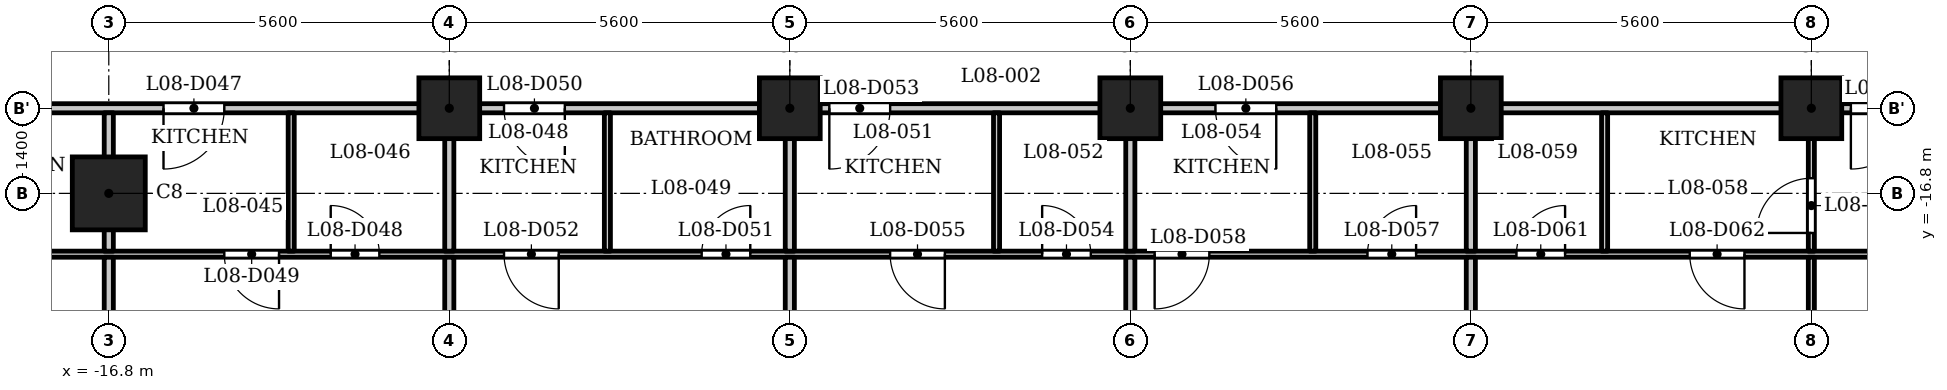
"""IFC4 building model, lengths in metres.
Left out: names, types, materials, properties, quantities, classifications, styles, units other than length and angle.
Written with IfcOpenShell. Run it as: python <this file> out.ifc"""

import sys

from ifc_helpers import new_model, si_unit, direction, frame, frame_2d, origin, origin_2d, place, context, subcontext, project, spatial, rectangle, extrude, element, fill, save


model = new_model("IFC4")
c1 = context("Model", 3, precision=1e-05, world=origin(), true_north=direction((0.0, 1.0)))
c2 = subcontext(c1, "Body", "Model", "MODEL_VIEW")
j1 = project(units=[si_unit("LENGTHUNIT", "METRE"), si_unit("PLANEANGLEUNIT", "RADIAN")], contexts=[c1])
p1 = place(None, origin())
s1 = spatial("IfcSite", under=j1, at=p1, CompositionType="ELEMENT")
p2 = place(p1, origin())
s2 = spatial("IfcBuilding", under=s1, at=p2, CompositionType="ELEMENT")
p3 = place(p2, frame((0.0, 0.0, 37.5)))
s3 = spatial("IfcBuildingStorey", under=s2, at=p3, CompositionType="ELEMENT", Elevation=37.5)
p4 = place(p3, frame((-16.8, -16.8, 0.0), z_axis=(0.0, 0.0, 1.0), x_axis=(1.0, 0.0, 0.0)))
e1 = element("IfcColumn", 1, at=p4, inside=s3, PredefinedType="COLUMN", context=c2, shape_type="SweptSolid", body=[
    extrude(rectangle(XDim=1.2, YDim=1.2, at=origin_2d()), origin(), (0.0, 0.0, 1.0), 3.5),
])
for number, where, z_axis, x_axis in (
    (2, (-11.2, -15.4, 0.0), (0.0, 0.0, 1.0), (1.0, 0.0, 0.0)),
    (3, (-5.6, -15.4, 0.0), (0.0, 0.0, 1.0), (1.0, 0.0, 0.0)),
    (4, (0.0, -15.4, 0.0), (0.0, 0.0, 1.0), (1.0, 0.0, 0.0)),
    (5, (5.6, -15.4, 0.0), (0.0, 0.0, 1.0), (1.0, 0.0, 0.0)),
    (6, (11.2, -15.4, 0.0), (0.0, 0.0, 1.0), (1.0, 0.0, 0.0)),
):
    element("IfcColumn", number, at=place(p3, frame(where, z_axis=z_axis, x_axis=x_axis)), inside=s3, PredefinedType="COLUMN", context=c2, shape_type="SweptSolid", body=[
        extrude(rectangle(XDim=1.0, YDim=1.0, at=origin_2d()), origin(), (0.0, 0.0, 1.0), 3.5),
    ])
p5 = place(p3, frame((-26.394, -17.8, 0.0), z_axis=(0.0, 0.0, 1.0), x_axis=(1.0, 0.0, 0.0)))
e7 = element("IfcWall", 7, at=p5, inside=s3, PredefinedType="PARTITIONING", context=c2, shape_type="SweptSolid", body=[
    extrude(rectangle(XDim=53.126, YDim=0.1, at=frame_2d((26.563, 0.0))), origin(), (0.0, 0.0, 1.0), 3.2),
])
p6 = place(p5, frame((0.794, 0.0, 0.0)))
e8 = element("IfcOpeningElement", 8, at=p6, cuts=e7, PredefinedType="OPENING", context=c2, shape_type="SweptSolid", body=[
    extrude(rectangle(XDim=0.8, YDim=2.1, at=frame_2d((0.4, 1.05))), frame((0.0, 0.06, 0.0), z_axis=(0.0, -1.0, 0.0), x_axis=(1.0, 0.0, 0.0)), (0.0, 0.0, 1.0), 0.12),
])
p7 = place(p5, frame((5.644, 0.0, 0.0)))
e9 = element("IfcOpeningElement", 9, at=p7, cuts=e7, PredefinedType="OPENING", context=c2, shape_type="SweptSolid", body=[
    extrude(rectangle(XDim=0.9, YDim=2.1, at=frame_2d((0.45, 1.05))), frame((0.0, 0.06, 0.0), z_axis=(0.0, -1.0, 0.0), x_axis=(1.0, 0.0, 0.0)), (0.0, 0.0, 1.0), 0.12),
])
p8 = place(p5, frame((13.244, 0.0, 0.0)))
e10 = element("IfcOpeningElement", 10, at=p8, cuts=e7, PredefinedType="OPENING", context=c2, shape_type="SweptSolid", body=[
    extrude(rectangle(XDim=0.8, YDim=2.1, at=frame_2d((0.4, 1.05))), frame((0.0, 0.06, 0.0), z_axis=(0.0, -1.0, 0.0), x_axis=(1.0, 0.0, 0.0)), (0.0, 0.0, 1.0), 0.12),
])
p9 = place(p5, frame((11.494, 0.0, 0.0)))
e11 = element("IfcOpeningElement", 11, at=p9, cuts=e7, PredefinedType="OPENING", context=c2, shape_type="SweptSolid", body=[
    extrude(rectangle(XDim=0.9, YDim=2.1, at=frame_2d((0.45, 1.05))), frame((0.0, 0.06, 0.0), z_axis=(0.0, -1.0, 0.0), x_axis=(1.0, 0.0, 0.0)), (0.0, 0.0, 1.0), 0.12),
])
p10 = place(p5, frame((19.344, 0.0, 0.0)))
e12 = element("IfcOpeningElement", 12, at=p10, cuts=e7, PredefinedType="OPENING", context=c2, shape_type="SweptSolid", body=[
    extrude(rectangle(XDim=0.8, YDim=2.1, at=frame_2d((0.4, 1.05))), frame((0.0, 0.06, 0.0), z_axis=(0.0, -1.0, 0.0), x_axis=(1.0, 0.0, 0.0)), (0.0, 0.0, 1.0), 0.12),
])
p11 = place(p5, frame((16.094, 0.0, 0.0)))
e13 = element("IfcOpeningElement", 13, at=p11, cuts=e7, PredefinedType="OPENING", context=c2, shape_type="SweptSolid", body=[
    extrude(rectangle(XDim=0.9, YDim=2.1, at=frame_2d((0.45, 1.05))), frame((0.0, 0.06, 0.0), z_axis=(0.0, -1.0, 0.0), x_axis=(1.0, 0.0, 0.0)), (0.0, 0.0, 1.0), 0.12),
])
p12 = place(p5, frame((24.944, 0.0, 0.0)))
e14 = element("IfcOpeningElement", 14, at=p12, cuts=e7, PredefinedType="OPENING", context=c2, shape_type="SweptSolid", body=[
    extrude(rectangle(XDim=0.8, YDim=2.1, at=frame_2d((0.4, 1.05))), frame((0.0, 0.06, 0.0), z_axis=(0.0, -1.0, 0.0), x_axis=(1.0, 0.0, 0.0)), (0.0, 0.0, 1.0), 0.12),
])
p13 = place(p5, frame((22.444, 0.0, 0.0)))
e15 = element("IfcOpeningElement", 15, at=p13, cuts=e7, PredefinedType="OPENING", context=c2, shape_type="SweptSolid", body=[
    extrude(rectangle(XDim=0.9, YDim=2.1, at=frame_2d((0.45, 1.05))), frame((0.0, 0.06, 0.0), z_axis=(0.0, -1.0, 0.0), x_axis=(1.0, 0.0, 0.0)), (0.0, 0.0, 1.0), 0.12),
])
p14 = place(p5, frame((30.294, 0.0, 0.0)))
e16 = element("IfcOpeningElement", 16, at=p14, cuts=e7, PredefinedType="OPENING", context=c2, shape_type="SweptSolid", body=[
    extrude(rectangle(XDim=0.8, YDim=2.1, at=frame_2d((0.4, 1.05))), frame((0.0, 0.06, 0.0), z_axis=(0.0, -1.0, 0.0), x_axis=(1.0, 0.0, 0.0)), (0.0, 0.0, 1.0), 0.12),
])
p15 = place(p5, frame((26.794, 0.0, 0.0)))
e17 = element("IfcOpeningElement", 17, at=p15, cuts=e7, PredefinedType="OPENING", context=c2, shape_type="SweptSolid", body=[
    extrude(rectangle(XDim=0.9, YDim=2.1, at=frame_2d((0.45, 1.05))), frame((0.0, 0.06, 0.0), z_axis=(0.0, -1.0, 0.0), x_axis=(1.0, 0.0, 0.0)), (0.0, 0.0, 1.0), 0.12),
])
p16 = place(p5, frame((32.744, 0.0, 0.0)))
e18 = element("IfcOpeningElement", 18, at=p16, cuts=e7, PredefinedType="OPENING", context=c2, shape_type="SweptSolid", body=[
    extrude(rectangle(XDim=0.8, YDim=2.1, at=frame_2d((0.4, 1.05))), frame((0.0, 0.06, 0.0), z_axis=(0.0, -1.0, 0.0), x_axis=(1.0, 0.0, 0.0)), (0.0, 0.0, 1.0), 0.12),
])
p17 = place(p5, frame((35.594, 0.0, 0.0)))
e19 = element("IfcOpeningElement", 19, at=p17, cuts=e7, PredefinedType="OPENING", context=c2, shape_type="SweptSolid", body=[
    extrude(rectangle(XDim=0.9, YDim=2.1, at=frame_2d((0.45, 1.05))), frame((0.0, 0.06, 0.0), z_axis=(0.0, -1.0, 0.0), x_axis=(1.0, 0.0, 0.0)), (0.0, 0.0, 1.0), 0.12),
])
p18 = place(p5, frame((39.244, 0.0, 0.0)))
e20 = element("IfcOpeningElement", 20, at=p18, cuts=e7, PredefinedType="OPENING", context=c2, shape_type="SweptSolid", body=[
    extrude(rectangle(XDim=0.9, YDim=2.1, at=frame_2d((0.45, 1.05))), frame((0.0, 0.06, 0.0), z_axis=(0.0, -1.0, 0.0), x_axis=(1.0, 0.0, 0.0)), (0.0, 0.0, 1.0), 0.12),
])
p19 = place(p5, frame((41.544, 0.0, 0.0)))
e21 = element("IfcOpeningElement", 21, at=p19, cuts=e7, PredefinedType="OPENING", context=c2, shape_type="SweptSolid", body=[
    extrude(rectangle(XDim=0.9, YDim=2.1, at=frame_2d((0.45, 1.05))), frame((0.0, 0.06, 0.0), z_axis=(0.0, -1.0, 0.0), x_axis=(1.0, 0.0, 0.0)), (0.0, 0.0, 1.0), 0.12),
])
p20 = place(p5, frame((49.362, 0.0, 0.0)))
e22 = element("IfcOpeningElement", 22, at=p20, cuts=e7, PredefinedType="OPENING", context=c2, shape_type="SweptSolid", body=[
    extrude(rectangle(XDim=0.8, YDim=2.1, at=frame_2d((0.4, 1.05))), frame((0.0, 0.06, 0.0), z_axis=(0.0, -1.0, 0.0), x_axis=(1.0, 0.0, 0.0)), (0.0, 0.0, 1.0), 0.12),
])
p21 = place(p5, frame((45.094, 0.0, 0.0)))
e23 = element("IfcOpeningElement", 23, at=p21, cuts=e7, PredefinedType="OPENING", context=c2, shape_type="SweptSolid", body=[
    extrude(rectangle(XDim=0.9, YDim=2.1, at=frame_2d((0.45, 1.05))), frame((0.0, 0.06, 0.0), z_axis=(0.0, -1.0, 0.0), x_axis=(1.0, 0.0, 0.0)), (0.0, 0.0, 1.0), 0.12),
])
p22 = place(p3, frame((-27.484, -15.4, 0.0), z_axis=(0.0, 0.0, 1.0), x_axis=(1.0, 0.0, 0.0)))
e24 = element("IfcWall", 24, at=p22, inside=s3, PredefinedType="PARTITIONING", context=c2, shape_type="SweptSolid", body=[
    extrude(rectangle(XDim=54.968, YDim=0.15, at=frame_2d((27.484, 0.0))), origin(), (0.0, 0.0, 1.0), 3.2),
])
p23 = place(p22, frame((5.734, 0.0, 0.0)))
e25 = element("IfcOpeningElement", 25, at=p23, cuts=e24, PredefinedType="OPENING", context=c2, shape_type="SweptSolid", body=[
    extrude(rectangle(XDim=1.0, YDim=2.1, at=frame_2d((0.5, 1.05))), frame((0.0, 0.085, 0.0), z_axis=(0.0, -1.0, 0.0), x_axis=(1.0, 0.0, 0.0)), (0.0, 0.0, 1.0), 0.17),
])
p24 = place(p22, frame((11.584, 0.0, 0.0)))
e26 = element("IfcOpeningElement", 26, at=p24, cuts=e24, PredefinedType="OPENING", context=c2, shape_type="SweptSolid", body=[
    extrude(rectangle(XDim=1.0, YDim=2.1, at=frame_2d((0.5, 1.05))), frame((0.0, 0.085, 0.0), z_axis=(0.0, -1.0, 0.0), x_axis=(1.0, 0.0, 0.0)), (0.0, 0.0, 1.0), 0.17),
])
p25 = place(p22, frame((17.184, 0.0, 0.0)))
e27 = element("IfcOpeningElement", 27, at=p25, cuts=e24, PredefinedType="OPENING", context=c2, shape_type="SweptSolid", body=[
    extrude(rectangle(XDim=1.0, YDim=2.1, at=frame_2d((0.5, 1.05))), frame((0.0, 0.085, 0.0), z_axis=(0.0, -1.0, 0.0), x_axis=(1.0, 0.0, 0.0)), (0.0, 0.0, 1.0), 0.17),
])
p26 = place(p22, frame((22.534, 0.0, 0.0)))
e28 = element("IfcOpeningElement", 28, at=p26, cuts=e24, PredefinedType="OPENING", context=c2, shape_type="SweptSolid", body=[
    extrude(rectangle(XDim=1.0, YDim=2.1, at=frame_2d((0.5, 1.05))), frame((0.0, 0.085, 0.0), z_axis=(0.0, -1.0, 0.0), x_axis=(1.0, 0.0, 0.0)), (0.0, 0.0, 1.0), 0.17),
])
p27 = place(p22, frame((28.884, 0.0, 0.0)))
e29 = element("IfcOpeningElement", 29, at=p27, cuts=e24, PredefinedType="OPENING", context=c2, shape_type="SweptSolid", body=[
    extrude(rectangle(XDim=1.0, YDim=2.1, at=frame_2d((0.5, 1.05))), frame((0.0, 0.085, 0.0), z_axis=(0.0, -1.0, 0.0), x_axis=(1.0, 0.0, 0.0)), (0.0, 0.0, 1.0), 0.17),
])
p28 = place(p22, frame((39.334, 0.0, 0.0)))
e30 = element("IfcOpeningElement", 30, at=p28, cuts=e24, PredefinedType="OPENING", context=c2, shape_type="SweptSolid", body=[
    extrude(rectangle(XDim=1.0, YDim=2.1, at=frame_2d((0.5, 1.05))), frame((0.0, 0.085, 0.0), z_axis=(0.0, -1.0, 0.0), x_axis=(1.0, 0.0, 0.0)), (0.0, 0.0, 1.0), 0.17),
])
p29 = place(p22, frame((45.184, 0.0, 0.0)))
e31 = element("IfcOpeningElement", 31, at=p29, cuts=e24, PredefinedType="OPENING", context=c2, shape_type="SweptSolid", body=[
    extrude(rectangle(XDim=1.0, YDim=2.1, at=frame_2d((0.5, 1.05))), frame((0.0, 0.085, 0.0), z_axis=(0.0, -1.0, 0.0), x_axis=(1.0, 0.0, 0.0)), (0.0, 0.0, 1.0), 0.17),
])
p30 = place(p3, frame((-16.8, -23.13, 0.0), z_axis=(0.0, 0.0, 1.0), x_axis=(0.0, 1.0, 0.0)))
e32 = element("IfcWall", 32, at=p30, inside=s3, PredefinedType="PARTITIONING", context=c2, shape_type="SweptSolid", body=[
    extrude(rectangle(XDim=5.28, YDim=0.15, at=frame_2d((2.64, 0.0))), origin(), (0.0, 0.0, 1.0), 3.2),
])
p31 = place(p3, frame((-16.8, -17.75, 0.0), z_axis=(0.0, 0.0, 1.0), x_axis=(0.0, 1.0, 0.0)))
e33 = element("IfcWall", 33, at=p31, inside=s3, PredefinedType="PARTITIONING", context=c2, shape_type="SweptSolid", body=[
    extrude(rectangle(XDim=2.275, YDim=0.15, at=frame_2d((1.137, 0.0))), origin(), (0.0, 0.0, 1.0), 3.2),
])
p32 = place(p3, frame((-13.8, -17.75, 0.0), z_axis=(0.0, 0.0, 1.0), x_axis=(0.0, 1.0, 0.0)))
e34 = element("IfcWall", 34, at=p32, inside=s3, PredefinedType="PARTITIONING", context=c2, shape_type="SweptSolid", body=[
    extrude(rectangle(XDim=2.275, YDim=0.1, at=frame_2d((1.137, 0.0))), origin(), (0.0, 0.0, 1.0), 3.2),
])
p33 = place(p3, frame((-11.2, -23.13, 0.0), z_axis=(0.0, 0.0, 1.0), x_axis=(0.0, 1.0, 0.0)))
e35 = element("IfcWall", 35, at=p33, inside=s3, PredefinedType="PARTITIONING", context=c2, shape_type="SweptSolid", body=[
    extrude(rectangle(XDim=5.28, YDim=0.15, at=frame_2d((2.64, 0.0))), origin(), (0.0, 0.0, 1.0), 3.2),
])
p34 = place(p3, frame((-11.2, -17.75, 0.0), z_axis=(0.0, 0.0, 1.0), x_axis=(0.0, 1.0, 0.0)))
e36 = element("IfcWall", 36, at=p34, inside=s3, PredefinedType="PARTITIONING", context=c2, shape_type="SweptSolid", body=[
    extrude(rectangle(XDim=2.275, YDim=0.15, at=frame_2d((1.137, 0.0))), origin(), (0.0, 0.0, 1.0), 3.2),
])
p35 = place(p3, frame((-8.6, -17.75, 0.0), z_axis=(0.0, 0.0, 1.0), x_axis=(0.0, 1.0, 0.0)))
e37 = element("IfcWall", 37, at=p35, inside=s3, PredefinedType="PARTITIONING", context=c2, shape_type="SweptSolid", body=[
    extrude(rectangle(XDim=2.275, YDim=0.1, at=frame_2d((1.137, 0.0))), origin(), (0.0, 0.0, 1.0), 3.2),
])
p36 = place(p3, frame((-5.6, -23.13, 0.0), z_axis=(0.0, 0.0, 1.0), x_axis=(0.0, 1.0, 0.0)))
e38 = element("IfcWall", 38, at=p36, inside=s3, PredefinedType="PARTITIONING", context=c2, shape_type="SweptSolid", body=[
    extrude(rectangle(XDim=5.28, YDim=0.15, at=frame_2d((2.64, 0.0))), origin(), (0.0, 0.0, 1.0), 3.2),
])
p37 = place(p3, frame((-5.6, -17.75, 0.0), z_axis=(0.0, 0.0, 1.0), x_axis=(0.0, 1.0, 0.0)))
e39 = element("IfcWall", 39, at=p37, inside=s3, PredefinedType="PARTITIONING", context=c2, shape_type="SweptSolid", body=[
    extrude(rectangle(XDim=2.275, YDim=0.15, at=frame_2d((1.137, 0.0))), origin(), (0.0, 0.0, 1.0), 3.2),
])
p38 = place(p3, frame((-2.2, -17.75, 0.0), z_axis=(0.0, 0.0, 1.0), x_axis=(0.0, 1.0, 0.0)))
e40 = element("IfcWall", 40, at=p38, inside=s3, PredefinedType="PARTITIONING", context=c2, shape_type="SweptSolid", body=[
    extrude(rectangle(XDim=2.275, YDim=0.1, at=frame_2d((1.137, 0.0))), origin(), (0.0, 0.0, 1.0), 3.2),
])
p39 = place(p3, frame((0.0, -23.13, 0.0), z_axis=(0.0, 0.0, 1.0), x_axis=(0.0, 1.0, 0.0)))
e41 = element("IfcWall", 41, at=p39, inside=s3, PredefinedType="PARTITIONING", context=c2, shape_type="SweptSolid", body=[
    extrude(rectangle(XDim=5.28, YDim=0.15, at=frame_2d((2.64, 0.0))), origin(), (0.0, 0.0, 1.0), 3.2),
])
p40 = place(p3, frame((0.0, -17.75, 0.0), z_axis=(0.0, 0.0, 1.0), x_axis=(0.0, 1.0, 0.0)))
e42 = element("IfcWall", 42, at=p40, inside=s3, PredefinedType="PARTITIONING", context=c2, shape_type="SweptSolid", body=[
    extrude(rectangle(XDim=2.275, YDim=0.15, at=frame_2d((1.137, 0.0))), origin(), (0.0, 0.0, 1.0), 3.2),
])
p41 = place(p3, frame((3.0, -17.75, 0.0), z_axis=(0.0, 0.0, 1.0), x_axis=(0.0, 1.0, 0.0)))
e43 = element("IfcWall", 43, at=p41, inside=s3, PredefinedType="PARTITIONING", context=c2, shape_type="SweptSolid", body=[
    extrude(rectangle(XDim=2.275, YDim=0.1, at=frame_2d((1.137, 0.0))), origin(), (0.0, 0.0, 1.0), 3.2),
])
p42 = place(p3, frame((5.6, -23.13, 0.0), z_axis=(0.0, 0.0, 1.0), x_axis=(0.0, 1.0, 0.0)))
e44 = element("IfcWall", 44, at=p42, inside=s3, PredefinedType="PARTITIONING", context=c2, shape_type="SweptSolid", body=[
    extrude(rectangle(XDim=5.28, YDim=0.15, at=frame_2d((2.64, 0.0))), origin(), (0.0, 0.0, 1.0), 3.2),
])
p43 = place(p3, frame((5.6, -17.75, 0.0), z_axis=(0.0, 0.0, 1.0), x_axis=(0.0, 1.0, 0.0)))
e45 = element("IfcWall", 45, at=p43, inside=s3, PredefinedType="PARTITIONING", context=c2, shape_type="SweptSolid", body=[
    extrude(rectangle(XDim=2.275, YDim=0.15, at=frame_2d((1.137, 0.0))), origin(), (0.0, 0.0, 1.0), 3.2),
])
p44 = place(p3, frame((7.8, -17.75, 0.0), z_axis=(0.0, 0.0, 1.0), x_axis=(0.0, 1.0, 0.0)))
e46 = element("IfcWall", 46, at=p44, inside=s3, PredefinedType="PARTITIONING", context=c2, shape_type="SweptSolid", body=[
    extrude(rectangle(XDim=2.275, YDim=0.1, at=frame_2d((1.137, 0.0))), origin(), (0.0, 0.0, 1.0), 3.2),
])
p45 = place(p3, frame((11.2, -23.13, 0.0), z_axis=(0.0, 0.0, 1.0), x_axis=(0.0, 1.0, 0.0)))
e47 = element("IfcWall", 47, at=p45, inside=s3, PredefinedType="PARTITIONING", context=c2, shape_type="SweptSolid", body=[
    extrude(rectangle(XDim=5.28, YDim=0.1, at=frame_2d((2.64, 0.0))), origin(), (0.0, 0.0, 1.0), 3.2),
])
p46 = place(p3, frame((11.2, -17.75, 0.0), z_axis=(0.0, 0.0, 1.0), x_axis=(0.0, 1.0, 0.0)))
e48 = element("IfcWall", 48, at=p46, inside=s3, PredefinedType="PARTITIONING", context=c2, shape_type="SweptSolid", body=[
    extrude(rectangle(XDim=2.275, YDim=0.1, at=frame_2d((1.137, 0.0))), origin(), (0.0, 0.0, 1.0), 3.2),
])
p47 = place(p46, frame((0.299, 0.0, 0.0)))
e49 = element("IfcOpeningElement", 49, at=p47, cuts=e48, PredefinedType="OPENING", context=c2, shape_type="SweptSolid", body=[
    extrude(rectangle(XDim=0.9, YDim=2.1, at=frame_2d((0.45, 1.05))), frame((0.0, 0.06, 0.0), z_axis=(0.0, -1.0, 0.0), x_axis=(1.0, 0.0, 0.0)), (0.0, 0.0, 1.0), 0.12),
])
p48 = place(p24, origin())
e50 = element("IfcDoor", 50, at=p48, inside=s3, OperationType="SINGLE_SWING_LEFT", PredefinedType="DOOR", context=c2, shape_type="SweptSolid", body=[
    extrude(rectangle(XDim=1.0, YDim=2.1, at=frame_2d((0.5, 1.05))), frame((0.0, 0.025, 0.0), z_axis=(0.0, -1.0, 0.0), x_axis=(1.0, 0.0, 0.0)), (0.0, 0.0, 1.0), 0.05),
])
fill(e26, e50)
p49 = place(p8, origin())
e51 = element("IfcDoor", 51, at=p49, inside=s3, OperationType="SINGLE_SWING_RIGHT", PredefinedType="DOOR", context=c2, shape_type="SweptSolid", body=[
    extrude(rectangle(XDim=0.8, YDim=2.1, at=frame_2d((0.4, 1.05))), frame((0.0, 0.025, 0.0), z_axis=(0.0, -1.0, 0.0), x_axis=(1.0, 0.0, 0.0)), (0.0, 0.0, 1.0), 0.05),
])
fill(e10, e51)
p50 = place(p9, origin())
e52 = element("IfcDoor", 52, at=p50, inside=s3, OperationType="SINGLE_SWING_RIGHT", PredefinedType="DOOR", context=c2, shape_type="SweptSolid", body=[
    extrude(rectangle(XDim=0.9, YDim=2.1, at=frame_2d((0.45, 1.05))), frame((0.0, 0.025, 0.0), z_axis=(0.0, -1.0, 0.0), x_axis=(1.0, 0.0, 0.0)), (0.0, 0.0, 1.0), 0.05),
])
fill(e11, e52)
p51 = place(p25, origin())
e53 = element("IfcDoor", 53, at=p51, inside=s3, OperationType="SINGLE_SWING_RIGHT", PredefinedType="DOOR", context=c2, shape_type="SweptSolid", body=[
    extrude(rectangle(XDim=1.0, YDim=2.1, at=frame_2d((0.5, 1.05))), frame((0.0, 0.025, 0.0), z_axis=(0.0, -1.0, 0.0), x_axis=(1.0, 0.0, 0.0)), (0.0, 0.0, 1.0), 0.05),
])
fill(e27, e53)
p52 = place(p10, origin())
e54 = element("IfcDoor", 54, at=p52, inside=s3, OperationType="SINGLE_SWING_LEFT", PredefinedType="DOOR", context=c2, shape_type="SweptSolid", body=[
    extrude(rectangle(XDim=0.8, YDim=2.1, at=frame_2d((0.4, 1.05))), frame((0.0, 0.025, 0.0), z_axis=(0.0, -1.0, 0.0), x_axis=(1.0, 0.0, 0.0)), (0.0, 0.0, 1.0), 0.05),
])
fill(e12, e54)
p53 = place(p11, origin())
e55 = element("IfcDoor", 55, at=p53, inside=s3, OperationType="SINGLE_SWING_RIGHT", PredefinedType="DOOR", context=c2, shape_type="SweptSolid", body=[
    extrude(rectangle(XDim=0.9, YDim=2.1, at=frame_2d((0.45, 1.05))), frame((0.0, 0.025, 0.0), z_axis=(0.0, -1.0, 0.0), x_axis=(1.0, 0.0, 0.0)), (0.0, 0.0, 1.0), 0.05),
])
fill(e13, e55)
p54 = place(p26, origin())
e56 = element("IfcDoor", 56, at=p54, inside=s3, OperationType="SINGLE_SWING_LEFT", PredefinedType="DOOR", context=c2, shape_type="SweptSolid", body=[
    extrude(rectangle(XDim=1.0, YDim=2.1, at=frame_2d((0.5, 1.05))), frame((0.0, 0.025, 0.0), z_axis=(0.0, -1.0, 0.0), x_axis=(1.0, 0.0, 0.0)), (0.0, 0.0, 1.0), 0.05),
])
fill(e28, e56)
p55 = place(p12, origin())
e57 = element("IfcDoor", 57, at=p55, inside=s3, OperationType="SINGLE_SWING_RIGHT", PredefinedType="DOOR", context=c2, shape_type="SweptSolid", body=[
    extrude(rectangle(XDim=0.8, YDim=2.1, at=frame_2d((0.4, 1.05))), frame((0.0, 0.025, 0.0), z_axis=(0.0, -1.0, 0.0), x_axis=(1.0, 0.0, 0.0)), (0.0, 0.0, 1.0), 0.05),
])
fill(e14, e57)
p56 = place(p13, origin())
e58 = element("IfcDoor", 58, at=p56, inside=s3, OperationType="SINGLE_SWING_RIGHT", PredefinedType="DOOR", context=c2, shape_type="SweptSolid", body=[
    extrude(rectangle(XDim=0.9, YDim=2.1, at=frame_2d((0.45, 1.05))), frame((0.0, 0.025, 0.0), z_axis=(0.0, -1.0, 0.0), x_axis=(1.0, 0.0, 0.0)), (0.0, 0.0, 1.0), 0.05),
])
fill(e15, e58)
p57 = place(p27, origin())
e59 = element("IfcDoor", 59, at=p57, inside=s3, OperationType="SINGLE_SWING_RIGHT", PredefinedType="DOOR", context=c2, shape_type="SweptSolid", body=[
    extrude(rectangle(XDim=1.0, YDim=2.1, at=frame_2d((0.5, 1.05))), frame((0.0, 0.025, 0.0), z_axis=(0.0, -1.0, 0.0), x_axis=(1.0, 0.0, 0.0)), (0.0, 0.0, 1.0), 0.05),
])
fill(e29, e59)
p58 = place(p14, origin())
e60 = element("IfcDoor", 60, at=p58, inside=s3, OperationType="SINGLE_SWING_LEFT", PredefinedType="DOOR", context=c2, shape_type="SweptSolid", body=[
    extrude(rectangle(XDim=0.8, YDim=2.1, at=frame_2d((0.4, 1.05))), frame((0.0, 0.025, 0.0), z_axis=(0.0, -1.0, 0.0), x_axis=(1.0, 0.0, 0.0)), (0.0, 0.0, 1.0), 0.05),
])
fill(e16, e60)
p59 = place(p15, origin())
e61 = element("IfcDoor", 61, at=p59, inside=s3, OperationType="SINGLE_SWING_LEFT", PredefinedType="DOOR", context=c2, shape_type="SweptSolid", body=[
    extrude(rectangle(XDim=0.9, YDim=2.1, at=frame_2d((0.45, 1.05))), frame((0.0, 0.025, 0.0), z_axis=(0.0, -1.0, 0.0), x_axis=(1.0, 0.0, 0.0)), (0.0, 0.0, 1.0), 0.05),
])
fill(e17, e61)
p60 = place(p28, origin())
e62 = element("IfcDoor", 62, at=p60, inside=s3, OperationType="SINGLE_SWING_LEFT", PredefinedType="DOOR", context=c2, shape_type="SweptSolid", body=[
    extrude(rectangle(XDim=1.0, YDim=2.1, at=frame_2d((0.5, 1.05))), frame((0.0, 0.025, 0.0), z_axis=(0.0, -1.0, 0.0), x_axis=(1.0, 0.0, 0.0)), (0.0, 0.0, 1.0), 0.05),
])
fill(e30, e62)
p61 = place(p47, origin())
e63 = element("IfcDoor", 63, at=p61, inside=s3, OperationType="SINGLE_SWING_RIGHT", PredefinedType="DOOR", context=c2, shape_type="SweptSolid", body=[
    extrude(rectangle(XDim=0.9, YDim=2.1, at=frame_2d((0.45, 1.05))), frame((0.0, 0.025, 0.0), z_axis=(0.0, -1.0, 0.0), x_axis=(1.0, 0.0, 0.0)), (0.0, 0.0, 1.0), 0.05),
])
fill(e49, e63)
p62 = place(p16, origin())
e64 = element("IfcDoor", 64, at=p62, inside=s3, OperationType="SINGLE_SWING_LEFT", PredefinedType="DOOR", context=c2, shape_type="SweptSolid", body=[
    extrude(rectangle(XDim=0.8, YDim=2.1, at=frame_2d((0.4, 1.05))), frame((0.0, 0.025, 0.0), z_axis=(0.0, -1.0, 0.0), x_axis=(1.0, 0.0, 0.0)), (0.0, 0.0, 1.0), 0.05),
])
fill(e18, e64)
p63 = place(p17, origin())
e65 = element("IfcDoor", 65, at=p63, inside=s3, OperationType="SINGLE_SWING_RIGHT", PredefinedType="DOOR", context=c2, shape_type="SweptSolid", body=[
    extrude(rectangle(XDim=0.9, YDim=2.1, at=frame_2d((0.45, 1.05))), frame((0.0, 0.025, 0.0), z_axis=(0.0, -1.0, 0.0), x_axis=(1.0, 0.0, 0.0)), (0.0, 0.0, 1.0), 0.05),
])
fill(e19, e65)
save(model, sys.argv[1])
